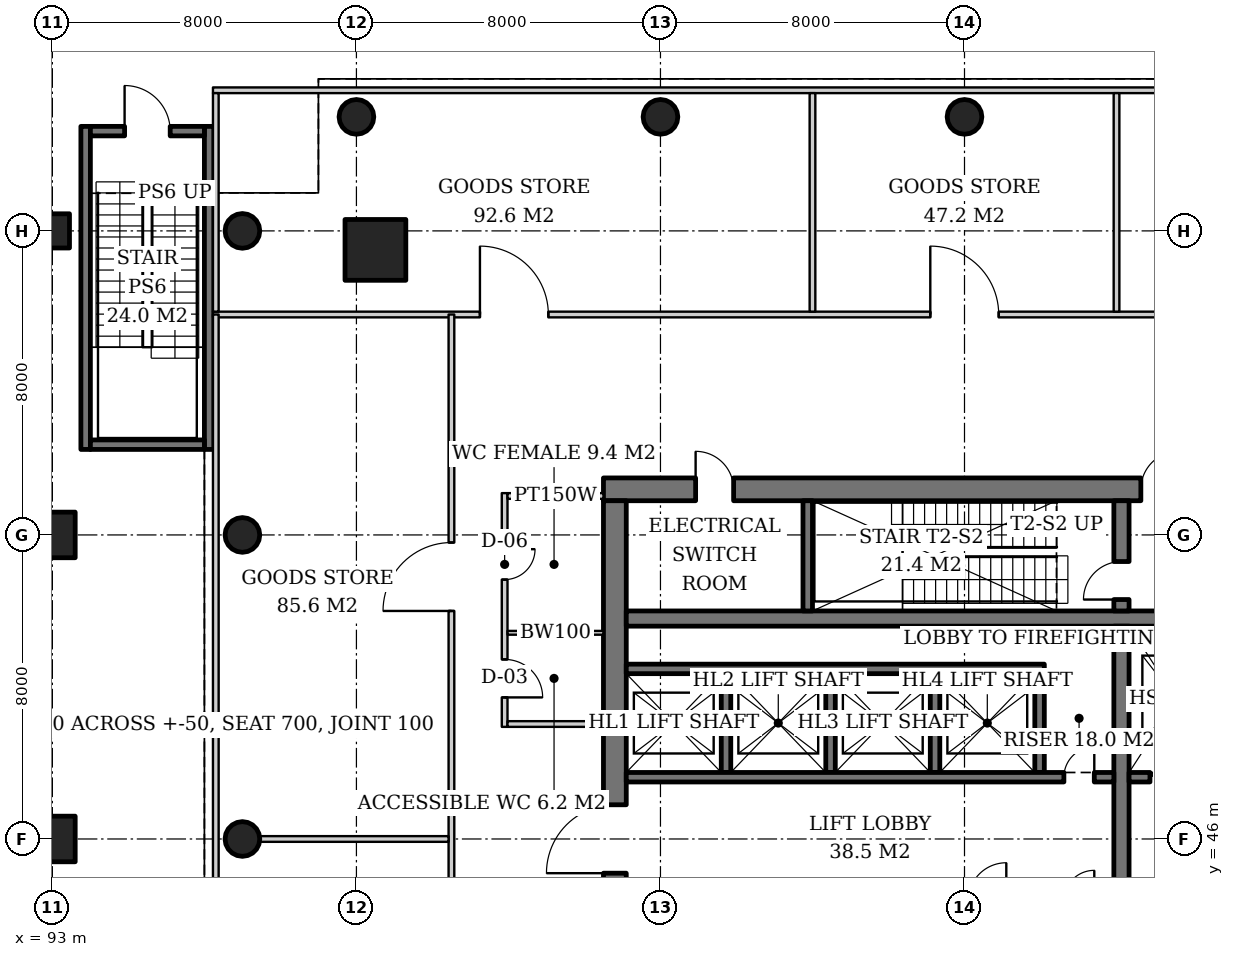
"""IFC4 building model, lengths in metres.
Left out: names, types, materials, properties, quantities, classifications, styles, units other than length and angle.
Written with IfcOpenShell. Run it as: python <this file> out.ifc"""

import sys

from ifc_helpers import new_model, si_unit, direction, frame, frame_2d, origin, origin_2d, place, context, subcontext, project, spatial, rectangle, hollow_circle, extrude, element, fill, save


model = new_model("IFC4")
c1 = context("Model", 3, precision=1e-05, world=origin(), true_north=direction((0.0, 1.0)))
c2 = subcontext(c1, "Body", "Model", "MODEL_VIEW")
j1 = project(units=[si_unit("LENGTHUNIT", "METRE"), si_unit("PLANEANGLEUNIT", "RADIAN")], contexts=[c1])
p1 = place(None, origin())
s1 = spatial("IfcSite", under=j1, at=p1, CompositionType="ELEMENT")
p2 = place(p1, origin())
s2 = spatial("IfcBuilding", under=s1, at=p2, CompositionType="ELEMENT")
p3 = place(p2, frame((0.0, 0.0, 6.0)))
s3 = spatial("IfcBuildingStorey", under=s2, at=p3, CompositionType="ELEMENT", Elevation=6.0)
for number, where, z_axis, x_axis in (
    (1, (93.0, 46.0, 0.0), (0.0, 0.0, 1.0), (1.0, 0.0, 0.0)),
    (2, (93.0, 54.0, 0.0), (0.0, 0.0, 1.0), (1.0, 0.0, 0.0)),
):
    element("IfcColumn", number, at=place(p3, frame(where, z_axis=z_axis, x_axis=x_axis)), inside=s3, PredefinedType="COLUMN", context=c2, shape_type="SweptSolid", body=[
        extrude(rectangle(XDim=1.2, YDim=1.2, at=origin_2d()), origin(), (0.0, 0.0, 1.0), 5.0),
    ])
p4 = place(p3, frame((93.0, 62.0, 0.0), z_axis=(0.0, 0.0, 1.0), x_axis=(1.0, 0.0, 0.0)))
e3 = element("IfcColumn", 3, at=p4, inside=s3, PredefinedType="COLUMN", context=c2, shape_type="SweptSolid", body=[
    extrude(rectangle(XDim=0.9, YDim=0.9, at=origin_2d()), origin(), (0.0, 0.0, 1.0), 5.0),
])
p5 = place(p3, frame((101.5, 61.5, 0.0), z_axis=(0.0, 0.0, 1.0), x_axis=(1.0, 0.0, 0.0)))
e4 = element("IfcColumn", 4, at=p5, inside=s3, PredefinedType="COLUMN", context=c2, shape_type="SweptSolid", body=[
    extrude(rectangle(XDim=1.6, YDim=1.6, at=origin_2d()), origin(), (0.0, 0.0, 1.0), 5.0),
])
for number, where, z_axis, x_axis in (
    (5, (101.0, 65.0, 0.0), (0.0, 0.0, 1.0), (1.0, 0.0, 0.0)),
    (6, (117.0, 65.0, 0.0), (0.0, 0.0, 1.0), (1.0, 0.0, 0.0)),
    (7, (109.0, 65.0, 0.0), (0.0, 0.0, 1.0), (1.0, 0.0, 0.0)),
    (8, (98.0, 62.0, 0.0), (0.0, 0.0, 1.0), (1.0, 0.0, 0.0)),
    (9, (98.0, 54.0, 0.0), (0.0, 0.0, 1.0), (1.0, 0.0, 0.0)),
    (10, (98.0, 46.0, 0.0), (0.0, 0.0, 1.0), (1.0, 0.0, 0.0)),
):
    element("IfcColumn", number, at=place(p3, frame(where, z_axis=z_axis, x_axis=x_axis)), inside=s3, PredefinedType="COLUMN", context=c2, shape_type="SweptSolid", body=[
        extrude(hollow_circle(Radius=0.457, WallThickness=0.03, at=origin_2d()), origin(), (0.0, 0.0, 1.0), 5.0),
    ])
p6 = place(p3, frame((107.5, 55.2, 0.0), z_axis=(0.0, 0.0, 1.0), x_axis=(1.0, 0.0, 0.0)))
e11 = element("IfcWall", 11, at=p6, inside=s3, PredefinedType="SHEAR", context=c2, shape_type="SweptSolid", body=[
    extrude(rectangle(XDim=19.0, YDim=0.6, at=frame_2d((9.5, 0.0))), origin(), (0.0, 0.0, 1.0), 5.0),
])
p7 = place(p6, frame((14.14, 0.0, 0.0)))
e12 = element("IfcOpeningElement", 12, at=p7, cuts=e11, PredefinedType="OPENING", context=c2, shape_type="SweptSolid", body=[
    extrude(rectangle(XDim=1.0, YDim=2.1, at=frame_2d((0.5, 1.05))), frame((0.0, 0.31, 0.0), z_axis=(0.0, -1.0, 0.0), x_axis=(1.0, 0.0, 0.0)), (0.0, 0.0, 1.0), 0.62),
])
p8 = place(p6, frame((2.425, 0.0, 0.0)))
e13 = element("IfcOpeningElement", 13, at=p8, cuts=e11, PredefinedType="OPENING", context=c2, shape_type="SweptSolid", body=[
    extrude(rectangle(XDim=1.0, YDim=2.1, at=frame_2d((0.5, 1.05))), frame((0.0, 0.31, 0.0), z_axis=(0.0, -1.0, 0.0), x_axis=(1.0, 0.0, 0.0)), (0.0, 0.0, 1.0), 0.62),
])
p9 = place(p3, frame((107.8, 37.1, 0.0), z_axis=(0.0, 0.0, 1.0), x_axis=(0.0, 1.0, 0.0)))
e14 = element("IfcWall", 14, at=p9, inside=s3, PredefinedType="SHEAR", context=c2, shape_type="SweptSolid", body=[
    extrude(rectangle(XDim=17.8, YDim=0.6, at=frame_2d((8.9, 0.0))), origin(), (0.0, 0.0, 1.0), 5.0),
])
p10 = place(p9, frame((8.0, 0.0, 0.0)))
e15 = element("IfcOpeningElement", 15, at=p10, cuts=e14, PredefinedType="OPENING", context=c2, shape_type="SweptSolid", body=[
    extrude(rectangle(XDim=1.8, YDim=2.4, at=frame_2d((0.9, 1.2))), frame((0.0, 0.31, 0.0), z_axis=(0.0, -1.0, 0.0), x_axis=(1.0, 0.0, 0.0)), (0.0, 0.0, 1.0), 0.62),
])
p11 = place(p3, frame((108.1, 51.8, 0.0), z_axis=(0.0, 0.0, 1.0), x_axis=(1.0, 0.0, 0.0)))
e16 = element("IfcWall", 16, at=p11, inside=s3, PredefinedType="SHEAR", context=c2, shape_type="SweptSolid", body=[
    extrude(rectangle(XDim=17.8, YDim=0.4, at=frame_2d((8.9, 0.0))), origin(), (0.0, 0.0, 1.0), 5.0),
])
p12 = place(p3, frame((121.13, 40.4, 0.0), z_axis=(0.0, 0.0, 1.0), x_axis=(0.0, 1.0, 0.0)))
e17 = element("IfcWall", 17, at=p12, inside=s3, PredefinedType="SHEAR", context=c2, shape_type="SweptSolid", body=[
    extrude(rectangle(XDim=11.2, YDim=0.4, at=frame_2d((5.6, 0.0))), origin(), (0.0, 0.0, 1.0), 5.0),
])
p13 = place(p3, frame((121.13, 52.0, 0.0), z_axis=(0.0, 0.0, 1.0), x_axis=(0.0, 1.0, 0.0)))
e18 = element("IfcWall", 18, at=p13, inside=s3, PredefinedType="SHEAR", context=c2, shape_type="SweptSolid", body=[
    extrude(rectangle(XDim=2.9, YDim=0.4, at=frame_2d((1.45, 0.0))), origin(), (0.0, 0.0, 1.0), 5.0),
])
p14 = place(p13, frame((0.3, 0.0, 0.0)))
e19 = element("IfcOpeningElement", 19, at=p14, cuts=e18, PredefinedType="OPENING", context=c2, shape_type="SweptSolid", body=[
    extrude(rectangle(XDim=1.0, YDim=2.1, at=frame_2d((0.5, 1.05))), frame((0.0, 0.21, 0.0), z_axis=(0.0, -1.0, 0.0), x_axis=(1.0, 0.0, 0.0)), (0.0, 0.0, 1.0), 0.42),
])
p15 = place(p3, frame((93.0, 49.0, 3.11), z_axis=(0.0, 0.0, 1.0), x_axis=(1.0, 0.0, 0.0)))
e20 = element("IfcColumn", 20, at=p15, inside=s3, PredefinedType="COLUMN", context=c2, shape_type="SweptSolid", body=[
    extrude(rectangle(XDim=0.3, YDim=0.4, at=origin_2d()), origin(), (0.0, 0.0, 1.0), 1.0),
])
p16 = place(p3, frame((112.875, 52.0, 0.0), z_axis=(0.0, 0.0, 1.0), x_axis=(0.0, 1.0, 0.0)))
e21 = element("IfcWall", 21, at=p16, inside=s3, PredefinedType="SHEAR", context=c2, shape_type="SweptSolid", body=[
    extrude(rectangle(XDim=2.9, YDim=0.25, at=frame_2d((1.45, 0.0))), origin(), (0.0, 0.0, 1.0), 5.0),
])
for number, where, z_axis, x_axis in (
    (22, (110.725, 47.75, 0.0), (0.0, 0.0, 1.0), (0.0, 1.0, 0.0)),
    (23, (113.475, 47.75, 0.0), (0.0, 0.0, 1.0), (0.0, 1.0, 0.0)),
    (24, (116.225, 47.75, 0.0), (0.0, 0.0, 1.0), (0.0, 1.0, 0.0)),
    (25, (118.975, 47.75, 0.0), (0.0, 0.0, 1.0), (0.0, 1.0, 0.0)),
):
    element("IfcWall", number, at=place(p3, frame(where, z_axis=z_axis, x_axis=x_axis)), inside=s3, PredefinedType="SHEAR", context=c2, shape_type="SweptSolid", body=[
        extrude(rectangle(XDim=2.6, YDim=0.25, at=frame_2d((1.3, 0.0))), origin(), (0.0, 0.0, 1.0), 5.0),
    ])
p17 = place(p3, frame((108.1, 50.475, 0.0), z_axis=(0.0, 0.0, 1.0), x_axis=(1.0, 0.0, 0.0)))
e26 = element("IfcWall", 26, at=p17, inside=s3, PredefinedType="SHEAR", context=c2, shape_type="SweptSolid", body=[
    extrude(rectangle(XDim=11.0, YDim=0.25, at=frame_2d((5.5, 0.0))), origin(), (0.0, 0.0, 1.0), 5.0),
])
p18 = place(p3, frame((108.1, 47.625, 0.0), z_axis=(0.0, 0.0, 1.0), x_axis=(1.0, 0.0, 0.0)))
e27 = element("IfcWall", 27, at=p18, inside=s3, PredefinedType="SHEAR", context=c2, shape_type="SweptSolid", body=[
    extrude(rectangle(XDim=12.83, YDim=0.25, at=frame_2d((6.415, 0.0))), origin(), (0.0, 0.0, 1.0), 5.0),
])
p19 = place(p18, frame((11.515, 0.0, 0.0)))
e28 = element("IfcOpeningElement", 28, at=p19, cuts=e27, PredefinedType="OPENING", context=c2, shape_type="SweptSolid", body=[
    extrude(rectangle(XDim=0.8, YDim=2.0, at=frame_2d((0.4, 1.0))), frame((0.0, 0.135, 0.0), z_axis=(0.0, -1.0, 0.0), x_axis=(1.0, 0.0, 0.0)), (0.0, 0.0, 1.0), 0.27),
])
p20 = place(p3, frame((121.33, 47.625, 0.0), z_axis=(0.0, 0.0, 1.0), x_axis=(1.0, 0.0, 0.0)))
e29 = element("IfcWall", 29, at=p20, inside=s3, PredefinedType="SHEAR", context=c2, shape_type="SweptSolid", body=[
    extrude(rectangle(XDim=4.57, YDim=0.25, at=frame_2d((2.285, 0.0))), origin(), (0.0, 0.0, 1.0), 5.0),
])
p21 = place(p20, frame((0.55, 0.0, 0.0)))
e30 = element("IfcOpeningElement", 30, at=p21, cuts=e29, PredefinedType="OPENING", context=c2, shape_type="SweptSolid", body=[
    extrude(rectangle(XDim=1.4, YDim=2.4, at=frame_2d((0.7, 1.2))), frame((0.0, 0.135, 0.0), z_axis=(0.0, -1.0, 0.0), x_axis=(1.0, 0.0, 0.0)), (0.0, 0.0, 1.0), 0.27),
])
p22 = place(p20, frame((3.26, 0.0, 0.0)))
e31 = element("IfcOpeningElement", 31, at=p22, cuts=e29, PredefinedType="OPENING", context=c2, shape_type="SweptSolid", body=[
    extrude(rectangle(XDim=0.8, YDim=2.0, at=frame_2d((0.4, 1.0))), frame((0.0, 0.135, 0.0), z_axis=(0.0, -1.0, 0.0), x_axis=(1.0, 0.0, 0.0)), (0.0, 0.0, 1.0), 0.27),
])
for number, where, z_axis, x_axis in (
    (32, (93.875, 56.25, 0.0), (0.0, 0.0, 1.0), (0.0, 1.0, 0.0)),
    (33, (97.125, 56.25, 0.0), (0.0, 0.0, 1.0), (0.0, 1.0, 0.0)),
):
    element("IfcWall", number, at=place(p3, frame(where, z_axis=z_axis, x_axis=x_axis)), inside=s3, PredefinedType="SOLIDWALL", context=c2, shape_type="SweptSolid", body=[
        extrude(rectangle(XDim=8.5, YDim=0.25, at=frame_2d((4.25, 0.0))), origin(), (0.0, 0.0, 1.0), 4.7),
    ])
p23 = place(p3, frame((94.0, 56.375, 0.0), z_axis=(0.0, 0.0, 1.0), x_axis=(1.0, 0.0, 0.0)))
e34 = element("IfcWall", 34, at=p23, inside=s3, PredefinedType="SOLIDWALL", context=c2, shape_type="SweptSolid", body=[
    extrude(rectangle(XDim=3.0, YDim=0.25, at=frame_2d((1.5, 0.0))), origin(), (0.0, 0.0, 1.0), 4.7),
])
p24 = place(p3, frame((94.0, 64.625, 0.0), z_axis=(0.0, 0.0, 1.0), x_axis=(1.0, 0.0, 0.0)))
e35 = element("IfcWall", 35, at=p24, inside=s3, PredefinedType="SOLIDWALL", context=c2, shape_type="SweptSolid", body=[
    extrude(rectangle(XDim=3.0, YDim=0.25, at=frame_2d((1.5, 0.0))), origin(), (0.0, 0.0, 1.0), 4.7),
])
p25 = place(p24, frame((0.9, 0.0, 0.0)))
e36 = element("IfcOpeningElement", 36, at=p25, cuts=e35, PredefinedType="OPENING", context=c2, shape_type="SweptSolid", body=[
    extrude(rectangle(XDim=1.2, YDim=2.1, at=frame_2d((0.6, 1.05))), frame((0.0, 0.135, 0.0), z_axis=(0.0, -1.0, 0.0), x_axis=(1.0, 0.0, 0.0)), (0.0, 0.0, 1.0), 0.27),
])
p26 = place(p3, frame((104.9, 55.1, 0.0), z_axis=(0.0, 0.0, 1.0), x_axis=(0.0, -1.0, 0.0)))
e37 = element("IfcWall", 37, at=p26, inside=s3, PredefinedType="PARTITIONING", context=c2, shape_type="SweptSolid", body=[
    extrude(rectangle(XDim=6.15, YDim=0.15, at=frame_2d((3.075, 0.0))), origin(), (0.0, 0.0, 1.0), 3.9),
])
p27 = place(p26, frame((1.475, 0.0, 0.0)))
e38 = element("IfcOpeningElement", 38, at=p27, cuts=e37, PredefinedType="OPENING", context=c2, shape_type="SweptSolid", body=[
    extrude(rectangle(XDim=0.8, YDim=2.1, at=frame_2d((0.4, 1.05))), frame((0.0, 0.085, 0.0), z_axis=(0.0, -1.0, 0.0), x_axis=(1.0, 0.0, 0.0)), (0.0, 0.0, 1.0), 0.17),
])
p28 = place(p26, frame((4.375, 0.0, 0.0)))
e39 = element("IfcOpeningElement", 39, at=p28, cuts=e37, PredefinedType="OPENING", context=c2, shape_type="SweptSolid", body=[
    extrude(rectangle(XDim=1.0, YDim=2.1, at=frame_2d((0.5, 1.05))), frame((0.0, 0.085, 0.0), z_axis=(0.0, -1.0, 0.0), x_axis=(1.0, 0.0, 0.0)), (0.0, 0.0, 1.0), 0.17),
])
p29 = place(p3, frame((104.975, 55.025, 0.0), z_axis=(0.0, 0.0, 1.0), x_axis=(1.0, 0.0, 0.0)))
e40 = element("IfcWall", 40, at=p29, inside=s3, PredefinedType="PARTITIONING", context=c2, shape_type="SweptSolid", body=[
    extrude(rectangle(XDim=2.525, YDim=0.15, at=frame_2d((1.262, 0.0))), origin(), (0.0, 0.0, 1.0), 3.9),
])
p30 = place(p3, frame((104.975, 51.425, 0.0), z_axis=(0.0, 0.0, 1.0), x_axis=(1.0, 0.0, 0.0)))
e41 = element("IfcWall", 41, at=p30, inside=s3, PredefinedType="SOLIDWALL", context=c2, shape_type="SweptSolid", body=[
    extrude(rectangle(XDim=2.525, YDim=0.1, at=frame_2d((1.262, 0.0))), origin(), (0.0, 0.0, 1.0), 4.7),
])
p31 = place(p3, frame((104.975, 49.025, 0.0), z_axis=(0.0, 0.0, 1.0), x_axis=(1.0, 0.0, 0.0)))
e42 = element("IfcWall", 42, at=p31, inside=s3, PredefinedType="PARTITIONING", context=c2, shape_type="SweptSolid", body=[
    extrude(rectangle(XDim=2.525, YDim=0.15, at=frame_2d((1.262, 0.0))), origin(), (0.0, 0.0, 1.0), 4.7),
])
p32 = place(p3, frame((97.225, 59.8, 0.0), z_axis=(0.0, 0.0, 1.0), x_axis=(1.0, 0.0, 0.0)))
e43 = element("IfcWall", 43, at=p32, inside=s3, PredefinedType="PARTITIONING", context=c2, shape_type="SweptSolid", body=[
    extrude(rectangle(XDim=39.55, YDim=0.15, at=frame_2d((19.775, 0.0))), origin(), (0.0, 0.0, 1.0), 3.9),
])
p33 = place(p32, frame((7.025, 0.0, 0.0)))
e44 = element("IfcOpeningElement", 44, at=p33, cuts=e43, PredefinedType="OPENING", context=c2, shape_type="SweptSolid", body=[
    extrude(rectangle(XDim=1.8, YDim=2.4, at=frame_2d((0.9, 1.2))), frame((0.0, 0.085, 0.0), z_axis=(0.0, -1.0, 0.0), x_axis=(1.0, 0.0, 0.0)), (0.0, 0.0, 1.0), 0.17),
])
p34 = place(p32, frame((18.875, 0.0, 0.0)))
e45 = element("IfcOpeningElement", 45, at=p34, cuts=e43, PredefinedType="OPENING", context=c2, shape_type="SweptSolid", body=[
    extrude(rectangle(XDim=1.8, YDim=2.4, at=frame_2d((0.9, 1.2))), frame((0.0, 0.085, 0.0), z_axis=(0.0, -1.0, 0.0), x_axis=(1.0, 0.0, 0.0)), (0.0, 0.0, 1.0), 0.17),
])
p35 = place(p32, frame((30.725, 0.0, 0.0)))
e46 = element("IfcOpeningElement", 46, at=p35, cuts=e43, PredefinedType="OPENING", context=c2, shape_type="SweptSolid", body=[
    extrude(rectangle(XDim=1.8, YDim=2.4, at=frame_2d((0.9, 1.2))), frame((0.0, 0.085, 0.0), z_axis=(0.0, -1.0, 0.0), x_axis=(1.0, 0.0, 0.0)), (0.0, 0.0, 1.0), 0.17),
])
p36 = place(p3, frame((97.225, 65.7, 0.0), z_axis=(0.0, 0.0, 1.0), x_axis=(1.0, 0.0, 0.0)))
e47 = element("IfcWall", 47, at=p36, inside=s3, PredefinedType="PARTITIONING", context=c2, shape_type="SweptSolid", body=[
    extrude(rectangle(XDim=39.55, YDim=0.15, at=frame_2d((19.775, 0.0))), origin(), (0.0, 0.0, 1.0), 4.7),
])
p37 = place(p3, frame((97.3, 59.875, 0.0), z_axis=(0.0, 0.0, 1.0), x_axis=(0.0, 1.0, 0.0)))
e48 = element("IfcWall", 48, at=p37, inside=s3, PredefinedType="PARTITIONING", context=c2, shape_type="SweptSolid", body=[
    extrude(rectangle(XDim=5.75, YDim=0.15, at=frame_2d((2.875, 0.0))), origin(), (0.0, 0.0, 1.0), 4.7),
])
for number, where, z_axis, x_axis in (
    (49, (113.0, 59.875, 0.0), (0.0, 0.0, 1.0), (0.0, 1.0, 0.0)),
    (50, (121.0, 59.875, 0.0), (0.0, 0.0, 1.0), (0.0, 1.0, 0.0)),
):
    element("IfcWall", number, at=place(p3, frame(where, z_axis=z_axis, x_axis=x_axis)), inside=s3, PredefinedType="PARTITIONING", context=c2, shape_type="SweptSolid", body=[
        extrude(rectangle(XDim=5.75, YDim=0.15, at=frame_2d((2.875, 0.0))), origin(), (0.0, 0.0, 1.0), 4.15),
    ])
p38 = place(p3, frame((97.3, 32.2, 0.0), z_axis=(0.0, 0.0, 1.0), x_axis=(0.0, 1.0, 0.0)))
e51 = element("IfcWall", 51, at=p38, inside=s3, PredefinedType="PARTITIONING", context=c2, shape_type="SweptSolid", body=[
    extrude(rectangle(XDim=27.6, YDim=0.15, at=frame_2d((13.8, 0.0))), origin(), (0.0, 0.0, 1.0), 4.7),
])
p39 = place(p3, frame((103.5, 32.2, 0.0), z_axis=(0.0, 0.0, 1.0), x_axis=(0.0, 1.0, 0.0)))
e52 = element("IfcWall", 52, at=p39, inside=s3, PredefinedType="PARTITIONING", context=c2, shape_type="SweptSolid", body=[
    extrude(rectangle(XDim=27.6, YDim=0.15, at=frame_2d((13.8, 0.0))), origin(), (0.0, 0.0, 1.0), 3.9),
])
p40 = place(p39, frame((6.0, 0.0, 0.0)))
e53 = element("IfcOpeningElement", 53, at=p40, cuts=e52, PredefinedType="OPENING", context=c2, shape_type="SweptSolid", body=[
    extrude(rectangle(XDim=1.8, YDim=2.4, at=frame_2d((0.9, 1.2))), frame((0.0, 0.085, 0.0), z_axis=(0.0, -1.0, 0.0), x_axis=(1.0, 0.0, 0.0)), (0.0, 0.0, 1.0), 0.17),
])
p41 = place(p39, frame((19.8, 0.0, 0.0)))
e54 = element("IfcOpeningElement", 54, at=p41, cuts=e52, PredefinedType="OPENING", context=c2, shape_type="SweptSolid", body=[
    extrude(rectangle(XDim=1.8, YDim=2.4, at=frame_2d((0.9, 1.2))), frame((0.0, 0.085, 0.0), z_axis=(0.0, -1.0, 0.0), x_axis=(1.0, 0.0, 0.0)), (0.0, 0.0, 1.0), 0.17),
])
p42 = place(p3, frame((98.457, 46.0, 0.0), z_axis=(0.0, 0.0, 1.0), x_axis=(1.0, 0.0, 0.0)))
e55 = element("IfcWall", 55, at=p42, inside=s3, PredefinedType="PARTITIONING", context=c2, shape_type="SweptSolid", body=[
    extrude(rectangle(XDim=4.968, YDim=0.15, at=frame_2d((2.484, 0.0))), origin(), (0.0, 0.0, 1.0), 4.7),
])
p43 = place(p19, origin())
e56 = element("IfcDoor", 56, at=p43, inside=s3, OperationType="SINGLE_SWING_RIGHT", PredefinedType="DOOR", context=c2, shape_type="SweptSolid", body=[
    extrude(rectangle(XDim=0.8, YDim=2.0, at=frame_2d((0.4, 1.0))), frame((0.0, 0.025, 0.0), z_axis=(0.0, -1.0, 0.0), x_axis=(1.0, 0.0, 0.0)), (0.0, 0.0, 1.0), 0.05),
])
fill(e28, e56)
p44 = place(p21, origin())
e57 = element("IfcDoor", 57, at=p44, inside=s3, OperationType="DOUBLE_DOOR_SLIDING", PredefinedType="DOOR", context=c2, shape_type="SweptSolid", body=[
    extrude(rectangle(XDim=1.4, YDim=2.4, at=frame_2d((0.7, 1.2))), frame((0.0, 0.025, 0.0), z_axis=(0.0, -1.0, 0.0), x_axis=(1.0, 0.0, 0.0)), (0.0, 0.0, 1.0), 0.05),
])
fill(e30, e57)
p45 = place(p14, origin())
e58 = element("IfcDoor", 58, at=p45, inside=s3, OperationType="SINGLE_SWING_LEFT", PredefinedType="DOOR", context=c2, shape_type="SweptSolid", body=[
    extrude(rectangle(XDim=1.0, YDim=2.1, at=frame_2d((0.5, 1.05))), frame((0.0, 0.025, 0.0), z_axis=(0.0, -1.0, 0.0), x_axis=(1.0, 0.0, 0.0)), (0.0, 0.0, 1.0), 0.05),
])
fill(e19, e58)
p46 = place(p7, origin())
e59 = element("IfcDoor", 59, at=p46, inside=s3, OperationType="SINGLE_SWING_RIGHT", PredefinedType="DOOR", context=c2, shape_type="SweptSolid", body=[
    extrude(rectangle(XDim=1.0, YDim=2.1, at=frame_2d((0.5, 1.05))), frame((0.0, 0.025, 0.0), z_axis=(0.0, -1.0, 0.0), x_axis=(1.0, 0.0, 0.0)), (0.0, 0.0, 1.0), 0.05),
])
fill(e12, e59)
p47 = place(p10, origin())
e60 = element("IfcDoor", 60, at=p47, inside=s3, OperationType="DOUBLE_DOOR_SINGLE_SWING", PredefinedType="DOOR", context=c2, shape_type="SweptSolid", body=[
    extrude(rectangle(XDim=1.8, YDim=2.4, at=frame_2d((0.9, 1.2))), frame((0.0, 0.025, 0.0), z_axis=(0.0, -1.0, 0.0), x_axis=(1.0, 0.0, 0.0)), (0.0, 0.0, 1.0), 0.05),
])
fill(e15, e60)
p48 = place(p8, origin())
e61 = element("IfcDoor", 61, at=p48, inside=s3, OperationType="SINGLE_SWING_LEFT", PredefinedType="DOOR", context=c2, shape_type="SweptSolid", body=[
    extrude(rectangle(XDim=1.0, YDim=2.1, at=frame_2d((0.5, 1.05))), frame((0.0, -0.24, 0.0), z_axis=(0.0, -1.0, 0.0), x_axis=(1.0, 0.0, 0.0)), (0.0, 0.0, 1.0), 0.05),
])
fill(e13, e61)
p49 = place(p25, origin())
e62 = element("IfcDoor", 62, at=p49, inside=s3, OperationType="SINGLE_SWING_LEFT", PredefinedType="DOOR", context=c2, shape_type="SweptSolid", body=[
    extrude(rectangle(XDim=1.2, YDim=2.1, at=frame_2d((0.6, 1.05))), frame((0.0, 0.025, 0.0), z_axis=(0.0, -1.0, 0.0), x_axis=(1.0, 0.0, 0.0)), (0.0, 0.0, 1.0), 0.05),
])
fill(e36, e62)
p50 = place(p27, origin())
e63 = element("IfcDoor", 63, at=p50, inside=s3, OperationType="SINGLE_SWING_LEFT", PredefinedType="DOOR", context=c2, shape_type="SweptSolid", body=[
    extrude(rectangle(XDim=0.8, YDim=2.1, at=frame_2d((0.4, 1.05))), frame((0.0, 0.025, 0.0), z_axis=(0.0, -1.0, 0.0), x_axis=(1.0, 0.0, 0.0)), (0.0, 0.0, 1.0), 0.05),
])
fill(e38, e63)
p51 = place(p28, origin())
e64 = element("IfcDoor", 64, at=p51, inside=s3, OperationType="SINGLE_SWING_RIGHT", PredefinedType="DOOR", context=c2, shape_type="SweptSolid", body=[
    extrude(rectangle(XDim=1.0, YDim=2.1, at=frame_2d((0.5, 1.05))), frame((0.0, 0.025, 0.0), z_axis=(0.0, -1.0, 0.0), x_axis=(1.0, 0.0, 0.0)), (0.0, 0.0, 1.0), 0.05),
])
fill(e39, e64)
p52 = place(p33, origin())
e65 = element("IfcDoor", 65, at=p52, inside=s3, OperationType="DOUBLE_DOOR_SINGLE_SWING", PredefinedType="DOOR", context=c2, shape_type="SweptSolid", body=[
    extrude(rectangle(XDim=1.8, YDim=2.4, at=frame_2d((0.9, 1.2))), frame((0.0, 0.025, 0.0), z_axis=(0.0, -1.0, 0.0), x_axis=(1.0, 0.0, 0.0)), (0.0, 0.0, 1.0), 0.05),
])
fill(e44, e65)
p53 = place(p34, origin())
e66 = element("IfcDoor", 66, at=p53, inside=s3, OperationType="DOUBLE_DOOR_SINGLE_SWING", PredefinedType="DOOR", context=c2, shape_type="SweptSolid", body=[
    extrude(rectangle(XDim=1.8, YDim=2.4, at=frame_2d((0.9, 1.2))), frame((0.0, 0.025, 0.0), z_axis=(0.0, -1.0, 0.0), x_axis=(1.0, 0.0, 0.0)), (0.0, 0.0, 1.0), 0.05),
])
fill(e45, e66)
p54 = place(p41, origin())
e67 = element("IfcDoor", 67, at=p54, inside=s3, OperationType="DOUBLE_DOOR_SINGLE_SWING", PredefinedType="DOOR", context=c2, shape_type="SweptSolid", body=[
    extrude(rectangle(XDim=1.8, YDim=2.4, at=frame_2d((0.9, 1.2))), frame((0.0, 0.025, 0.0), z_axis=(0.0, -1.0, 0.0), x_axis=(1.0, 0.0, 0.0)), (0.0, 0.0, 1.0), 0.05),
])
fill(e54, e67)
save(model, sys.argv[1])
